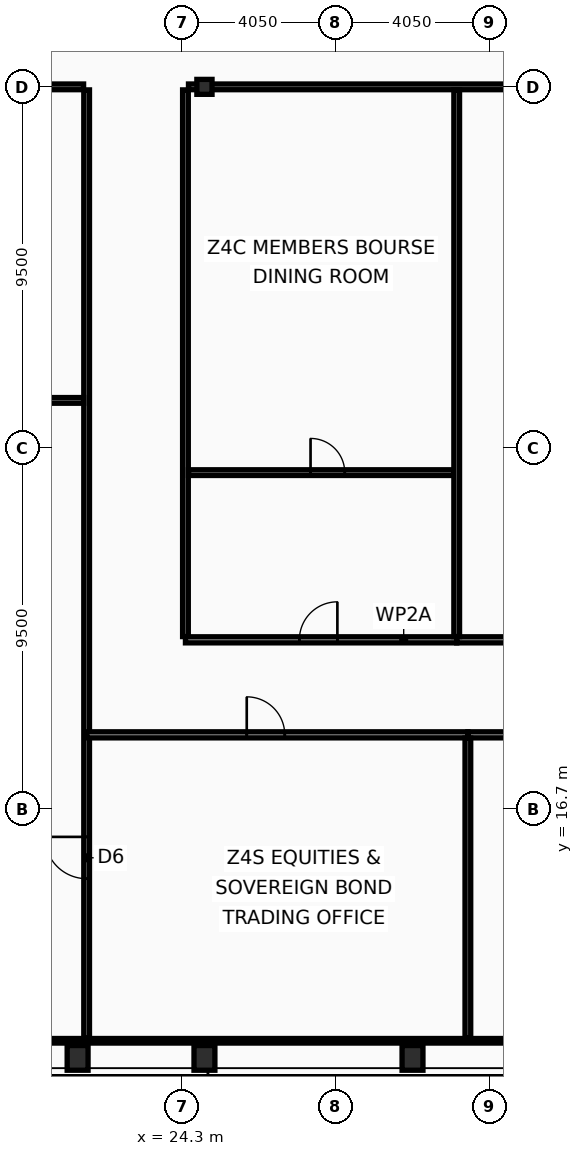
"""IFC4 building model, lengths in metres.
Left out: names, types, materials, properties, quantities, classifications, styles, units other than length and angle.
Written with IfcOpenShell. Run it as: python <this file> out.ifc"""

import sys

from ifc_helpers import new_model, si_unit, direction, frame, frame_2d, origin, origin_2d, place, context, subcontext, project, spatial, rectangle, hollow_rectangle, i_section, extrude, element, fill, save


model = new_model("IFC4")
c1 = context("Model", 3, precision=1e-05, world=origin(), true_north=direction((0.0, 1.0)))
c2 = subcontext(c1, "Body", "Model", "MODEL_VIEW")
j1 = project(units=[si_unit("LENGTHUNIT", "METRE"), si_unit("PLANEANGLEUNIT", "RADIAN")], contexts=[c1])
p1 = place(None, origin())
s1 = spatial("IfcSite", under=j1, at=p1, CompositionType="ELEMENT")
p2 = place(p1, origin())
s2 = spatial("IfcBuilding", under=s1, at=p2, CompositionType="ELEMENT")
p3 = place(p2, frame((0.0, 0.0, 291.4)))
s3 = spatial("IfcBuildingStorey", under=s2, at=p3, CompositionType="ELEMENT", Elevation=291.4)
for number, where, z_axis, x_axis in (
    (1, (21.562, 10.15, 0.0), (0.0, 0.0, 1.0), (1.0, 0.0, 0.0)),
    (2, (24.9, 10.15, 0.0), (0.0, 0.0, 1.0), (1.0, 0.0, 0.0)),
    (3, (30.375, 10.15, 0.0), (0.0, 0.0, 1.0), (1.0, 0.0, 0.0)),
):
    element("IfcColumn", number, at=place(p3, frame(where, z_axis=z_axis, x_axis=x_axis)), inside=s3, PredefinedType="COLUMN", context=c2, shape_type="SweptSolid", body=[
        extrude(hollow_rectangle(XDim=0.55, YDim=0.65, WallThickness=0.04, at=origin_2d()), origin(), (0.0, 0.0, 1.0), 3.6),
    ])
p4 = place(p3, frame((24.9, 35.7, 0.0), z_axis=(0.0, 0.0, 1.0), x_axis=(1.0, 0.0, 0.0)))
e4 = element("IfcColumn", 4, at=p4, inside=s3, PredefinedType="COLUMN", context=c2, shape_type="SweptSolid", body=[
    extrude(i_section(OverallWidth=0.399, OverallDepth=0.393, WebThickness=0.023, FlangeThickness=0.037, at=origin_2d()), origin(), (0.0, 0.0, 1.0), 3.6),
])
p5 = place(p3, frame((21.8, 10.665, 0.0), z_axis=(0.0, 0.0, 1.0), x_axis=(0.0, 1.0, 0.0)))
e5 = element("IfcWall", 5, at=p5, inside=s3, PredefinedType="PARTITIONING", context=c2, shape_type="SweptSolid", body=[
    extrude(rectangle(XDim=24.955, YDim=0.15, at=frame_2d((12.478, 0.0))), origin(), (0.0, 0.0, 1.0), 3.03),
])
p6 = place(p5, frame((4.2, 0.0, 0.0)))
e6 = element("IfcOpeningElement", 6, at=p6, cuts=e5, PredefinedType="OPENING", context=c2, shape_type="SweptSolid", body=[
    extrude(rectangle(XDim=1.1, YDim=2.1, at=frame_2d((0.55, 1.05))), frame((0.0, 0.085, 0.0), z_axis=(0.0, -1.0, 0.0), x_axis=(1.0, 0.0, 0.0)), (0.0, 0.0, 1.0), 0.17),
])
p7 = place(p3, frame((12.095, 35.7, 0.0), z_axis=(0.0, 0.0, 1.0), x_axis=(1.0, 0.0, 0.0)))
e7 = element("IfcWall", 7, at=p7, inside=s3, PredefinedType="PARTITIONING", context=c2, shape_type="SweptSolid", body=[
    extrude(rectangle(XDim=9.625, YDim=0.15, at=frame_2d((4.812, 0.0))), origin(), (0.0, 0.0, 1.0), 2.78),
])
p8 = place(p7, frame((2.8, 0.0, 0.0)))
e8 = element("IfcOpeningElement", 8, at=p8, cuts=e7, PredefinedType="OPENING", context=c2, shape_type="SweptSolid", body=[
    extrude(rectangle(XDim=1.0, YDim=2.05, at=frame_2d((0.5, 1.025))), frame((0.0, 0.085, 0.0), z_axis=(0.0, -1.0, 0.0), x_axis=(1.0, 0.0, 0.0)), (0.0, 0.0, 1.0), 0.17),
])
p9 = place(p3, frame((12.095, 27.45, 0.0), z_axis=(0.0, 0.0, 1.0), x_axis=(1.0, 0.0, 0.0)))
e9 = element("IfcWall", 9, at=p9, inside=s3, PredefinedType="PARTITIONING", context=c2, shape_type="SweptSolid", body=[
    extrude(rectangle(XDim=9.625, YDim=0.15, at=frame_2d((4.812, 0.0))), origin(), (0.0, 0.0, 1.0), 2.78),
])
p10 = place(p9, frame((2.2, 0.0, 0.0)))
e10 = element("IfcOpeningElement", 10, at=p10, cuts=e9, PredefinedType="OPENING", context=c2, shape_type="SweptSolid", body=[
    extrude(rectangle(XDim=0.9, YDim=2.05, at=frame_2d((0.45, 1.025))), frame((0.0, 0.085, 0.0), z_axis=(0.0, -1.0, 0.0), x_axis=(1.0, 0.0, 0.0)), (0.0, 0.0, 1.0), 0.17),
])
p11 = place(p3, frame((24.4, 21.235, 0.0), z_axis=(0.0, 0.0, 1.0), x_axis=(0.0, 1.0, 0.0)))
e11 = element("IfcWall", 11, at=p11, inside=s3, PredefinedType="PARTITIONING", context=c2, shape_type="SweptSolid", body=[
    extrude(rectangle(XDim=14.385, YDim=0.15, at=frame_2d((7.192, 0.0))), origin(), (0.0, 0.0, 1.0), 2.78),
])
p12 = place(p3, frame((24.48, 35.7, 0.0), z_axis=(0.0, 0.0, 1.0), x_axis=(1.0, 0.0, 0.0)))
e12 = element("IfcWall", 12, at=p12, inside=s3, PredefinedType="PARTITIONING", context=c2, shape_type="SweptSolid", body=[
    extrude(rectangle(XDim=25.02, YDim=0.15, at=frame_2d((12.51, 0.0))), origin(), (0.0, 0.0, 1.0), 2.78),
])
p13 = place(p3, frame((24.4, 21.15, 0.0), z_axis=(0.0, 0.0, 1.0), x_axis=(1.0, 0.0, 0.0)))
e13 = element("IfcWall", 13, at=p13, inside=s3, PredefinedType="PARTITIONING", context=c2, shape_type="SweptSolid", body=[
    extrude(rectangle(XDim=7.138, YDim=0.16, at=frame_2d((3.569, 0.0))), origin(), (0.0, 0.0, 1.0), 2.78),
])
p14 = place(p13, frame((2.998, 0.0, 0.0)))
e14 = element("IfcOpeningElement", 14, at=p14, cuts=e13, PredefinedType="OPENING", context=c2, shape_type="SweptSolid", body=[
    extrude(rectangle(XDim=1.0, YDim=2.05, at=frame_2d((0.5, 1.025))), frame((0.0, 0.09, 0.0), z_axis=(0.0, -1.0, 0.0), x_axis=(1.0, 0.0, 0.0)), (0.0, 0.0, 1.0), 0.18),
])
p15 = place(p3, frame((24.48, 25.55, 0.0), z_axis=(0.0, 0.0, 1.0), x_axis=(1.0, 0.0, 0.0)))
e15 = element("IfcWall", 15, at=p15, inside=s3, PredefinedType="PARTITIONING", context=c2, shape_type="SweptSolid", body=[
    extrude(rectangle(XDim=6.978, YDim=0.15, at=frame_2d((3.489, 0.0))), origin(), (0.0, 0.0, 1.0), 2.78),
])
p16 = place(p15, frame((3.212, 0.0, 0.0)))
e16 = element("IfcOpeningElement", 16, at=p16, cuts=e15, PredefinedType="OPENING", context=c2, shape_type="SweptSolid", body=[
    extrude(rectangle(XDim=0.9, YDim=2.05, at=frame_2d((0.45, 1.025))), frame((0.0, 0.085, 0.0), z_axis=(0.0, -1.0, 0.0), x_axis=(1.0, 0.0, 0.0)), (0.0, 0.0, 1.0), 0.17),
])
p17 = place(p3, frame((31.538, 21.15, 0.0), z_axis=(0.0, 0.0, 1.0), x_axis=(1.0, 0.0, 0.0)))
e17 = element("IfcWall", 17, at=p17, inside=s3, PredefinedType="PARTITIONING", context=c2, shape_type="SweptSolid", body=[
    extrude(rectangle(XDim=4.78, YDim=0.16, at=frame_2d((2.39, 0.0))), origin(), (0.0, 0.0, 1.0), 3.44),
])
p18 = place(p17, frame((2.008, 0.0, 0.0)))
e18 = element("IfcOpeningElement", 18, at=p18, cuts=e17, PredefinedType="OPENING", context=c2, shape_type="SweptSolid", body=[
    extrude(rectangle(XDim=1.0, YDim=2.05, at=frame_2d((0.5, 1.025))), frame((0.0, 0.09, 0.0), z_axis=(0.0, -1.0, 0.0), x_axis=(1.0, 0.0, 0.0)), (0.0, 0.0, 1.0), 0.18),
])
p19 = place(p3, frame((31.538, 21.235, 0.0), z_axis=(0.0, 0.0, 1.0), x_axis=(0.0, 1.0, 0.0)))
e19 = element("IfcWall", 19, at=p19, inside=s3, PredefinedType="PARTITIONING", context=c2, shape_type="SweptSolid", body=[
    extrude(rectangle(XDim=14.385, YDim=0.15, at=frame_2d((7.192, 0.0))), origin(), (0.0, 0.0, 1.0), 3.03),
])
p20 = place(p3, frame((21.8, 18.65, 0.0), z_axis=(0.0, 0.0, 1.0), x_axis=(1.0, 0.0, 0.0)))
e20 = element("IfcWall", 20, at=p20, inside=s3, PredefinedType="PARTITIONING", context=c2, shape_type="SweptSolid", body=[
    extrude(rectangle(XDim=10.032, YDim=0.16, at=frame_2d((5.016, 0.0))), origin(), (0.0, 0.0, 1.0), 2.78),
])
p21 = place(p20, frame((4.213, 0.0, 0.0)))
e21 = element("IfcOpeningElement", 21, at=p21, cuts=e20, PredefinedType="OPENING", context=c2, shape_type="SweptSolid", body=[
    extrude(rectangle(XDim=1.0, YDim=2.05, at=frame_2d((0.5, 1.025))), frame((0.0, 0.09, 0.0), z_axis=(0.0, -1.0, 0.0), x_axis=(1.0, 0.0, 0.0)), (0.0, 0.0, 1.0), 0.18),
])
p22 = place(p3, frame((31.832, 18.65, 0.0), z_axis=(0.0, 0.0, 1.0), x_axis=(1.0, 0.0, 0.0)))
e22 = element("IfcWall", 22, at=p22, inside=s3, PredefinedType="PARTITIONING", context=c2, shape_type="SweptSolid", body=[
    extrude(rectangle(XDim=8.488, YDim=0.16, at=frame_2d((4.244, 0.0))), origin(), (0.0, 0.0, 1.0), 3.44),
])
p23 = place(p22, frame((3.565, 0.0, 0.0)))
e23 = element("IfcOpeningElement", 23, at=p23, cuts=e22, PredefinedType="OPENING", context=c2, shape_type="SweptSolid", body=[
    extrude(rectangle(XDim=1.0, YDim=2.05, at=frame_2d((0.5, 1.025))), frame((0.0, 0.09, 0.0), z_axis=(0.0, -1.0, 0.0), x_axis=(1.0, 0.0, 0.0)), (0.0, 0.0, 1.0), 0.18),
])
p24 = place(p3, frame((31.832, 10.665, 0.0), z_axis=(0.0, 0.0, 1.0), x_axis=(0.0, 1.0, 0.0)))
e24 = element("IfcWall", 24, at=p24, inside=s3, PredefinedType="PARTITIONING", context=c2, shape_type="SweptSolid", body=[
    extrude(rectangle(XDim=7.9, YDim=0.15, at=frame_2d((3.95, 0.0))), origin(), (0.0, 0.0, 1.0), 3.03),
])
p25 = place(p3, frame((12.095, 10.6, 0.0), z_axis=(0.0, 0.0, 1.0), x_axis=(1.0, 0.0, 0.0)))
e25 = element("IfcWall", 25, at=p25, inside=s3, PredefinedType="PARTITIONING", context=c2, shape_type="SweptSolid", body=[
    extrude(rectangle(XDim=48.71, YDim=0.12, at=frame_2d((24.355, 0.0))), origin(), (0.0, 0.0, 1.0), 2.78),
])
p26 = place(p6, origin())
e26 = element("IfcDoor", 26, at=p26, inside=s3, OperationType="SINGLE_SWING_RIGHT", PredefinedType="DOOR", context=c2, shape_type="SweptSolid", body=[
    extrude(rectangle(XDim=1.1, YDim=2.1, at=frame_2d((0.55, 1.05))), frame((0.0, 0.025, 0.0), z_axis=(0.0, -1.0, 0.0), x_axis=(1.0, 0.0, 0.0)), (0.0, 0.0, 1.0), 0.05),
])
fill(e6, e26)
p27 = place(p14, origin())
e27 = element("IfcDoor", 27, at=p27, inside=s3, OperationType="SINGLE_SWING_RIGHT", PredefinedType="DOOR", context=c2, shape_type="SweptSolid", body=[
    extrude(rectangle(XDim=1.0, YDim=2.05, at=frame_2d((0.5, 1.025))), frame((0.0, 0.025, 0.0), z_axis=(0.0, -1.0, 0.0), x_axis=(1.0, 0.0, 0.0)), (0.0, 0.0, 1.0), 0.05),
])
fill(e14, e27)
p28 = place(p16, origin())
e28 = element("IfcDoor", 28, at=p28, inside=s3, OperationType="SINGLE_SWING_LEFT", PredefinedType="DOOR", context=c2, shape_type="SweptSolid", body=[
    extrude(rectangle(XDim=0.9, YDim=2.05, at=frame_2d((0.45, 1.025))), frame((0.0, 0.025, 0.0), z_axis=(0.0, -1.0, 0.0), x_axis=(1.0, 0.0, 0.0)), (0.0, 0.0, 1.0), 0.05),
])
fill(e16, e28)
p29 = place(p21, origin())
e29 = element("IfcDoor", 29, at=p29, inside=s3, OperationType="SINGLE_SWING_LEFT", PredefinedType="DOOR", context=c2, shape_type="SweptSolid", body=[
    extrude(rectangle(XDim=1.0, YDim=2.05, at=frame_2d((0.5, 1.025))), frame((0.0, 0.025, 0.0), z_axis=(0.0, -1.0, 0.0), x_axis=(1.0, 0.0, 0.0)), (0.0, 0.0, 1.0), 0.05),
])
fill(e21, e29)
save(model, sys.argv[1])
